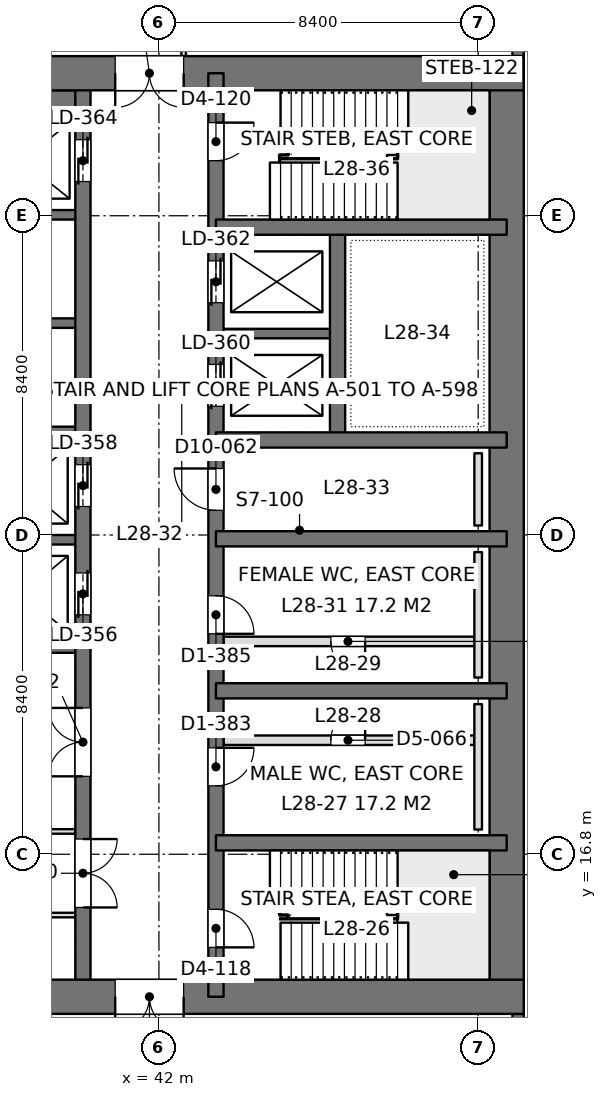
"""IFC4 building model, lengths in metres.
Left out: names, types, materials, properties, quantities, classifications, styles, units other than length and angle.
Written with IfcOpenShell. Run it as: python <this file> out.ifc"""

import sys

from ifc_helpers import new_model, si_unit, direction, frame, frame_2d, origin, place, context, subcontext, project, spatial, rectangle, extrude, element, fill, save


model = new_model("IFC4")
c1 = context("Model", 3, precision=1e-05, world=origin(), true_north=direction((0.0, 1.0)))
c2 = subcontext(c1, "Body", "Model", "MODEL_VIEW")
j1 = project(units=[si_unit("LENGTHUNIT", "METRE"), si_unit("PLANEANGLEUNIT", "RADIAN")], contexts=[c1])
p1 = place(None, origin())
s1 = spatial("IfcSite", under=j1, at=p1, CompositionType="ELEMENT")
p2 = place(p1, origin())
s2 = spatial("IfcBuilding", under=s1, at=p2, CompositionType="ELEMENT")
p3 = place(p2, frame((0.0, 0.0, 126.0)))
s3 = spatial("IfcBuildingStorey", under=s2, at=p3, CompositionType="ELEMENT", Elevation=126.0)
p4 = place(p3, frame((33.6, 13.05, 0.0), z_axis=(0.0, 0.0, 1.0), x_axis=(1.0, 0.0, 0.0)))
e1 = element("IfcWall", 1, at=p4, inside=s3, PredefinedType="SHEAR", context=c2, shape_type="SweptSolid", body=[
    extrude(rectangle(XDim=18.0, YDim=0.9, at=frame_2d((9.0, 0.0))), origin(), (0.0, 0.0, 1.0), 4.2),
])
p5 = place(p4, frame((7.25, 0.0, 0.0)))
e2 = element("IfcOpeningElement", 2, at=p5, cuts=e1, PredefinedType="OPENING", context=c2, shape_type="SweptSolid", body=[
    extrude(rectangle(XDim=1.8, YDim=2.4, at=frame_2d((0.9, 1.2))), frame((0.0, 0.46, 0.0), z_axis=(0.0, -1.0, 0.0), x_axis=(1.0, 0.0, 0.0)), (0.0, 0.0, 1.0), 0.92),
])
p6 = place(p3, frame((33.6, 37.35, 0.0), z_axis=(0.0, 0.0, 1.0), x_axis=(1.0, 0.0, 0.0)))
e3 = element("IfcWall", 3, at=p6, inside=s3, PredefinedType="SHEAR", context=c2, shape_type="SweptSolid", body=[
    extrude(rectangle(XDim=18.0, YDim=0.9, at=frame_2d((9.0, 0.0))), origin(), (0.0, 0.0, 1.0), 4.2),
])
p7 = place(p6, frame((7.25, 0.0, 0.0)))
e4 = element("IfcOpeningElement", 4, at=p7, cuts=e3, PredefinedType="OPENING", context=c2, shape_type="SweptSolid", body=[
    extrude(rectangle(XDim=1.8, YDim=2.4, at=frame_2d((0.9, 1.2))), frame((0.0, 0.46, 0.0), z_axis=(0.0, -1.0, 0.0), x_axis=(1.0, 0.0, 0.0)), (0.0, 0.0, 1.0), 0.92),
])
p8 = place(p3, frame((51.15, 13.05, 0.0), z_axis=(0.0, 0.0, 1.0), x_axis=(0.0, 1.0, 0.0)))
e5 = element("IfcWall", 5, at=p8, inside=s3, PredefinedType="SHEAR", context=c2, shape_type="SweptSolid", body=[
    extrude(rectangle(XDim=24.3, YDim=0.9, at=frame_2d((12.15, 0.0))), origin(), (0.0, 0.0, 1.0), 4.2),
])
p9 = place(p3, frame((43.5, 13.05, 0.0), z_axis=(0.0, 0.0, 1.0), x_axis=(0.0, 1.0, 0.0)))
e6 = element("IfcWall", 6, at=p9, inside=s3, PredefinedType="SHEAR", context=c2, shape_type="SweptSolid", body=[
    extrude(rectangle(XDim=24.3, YDim=0.4, at=frame_2d((12.15, 0.0))), origin(), (0.0, 0.0, 1.0), 4.2),
])
p10 = place(p9, frame((1.3, 0.0, 0.0)))
e7 = element("IfcOpeningElement", 7, at=p10, cuts=e6, PredefinedType="OPENING", context=c2, shape_type="SweptSolid", body=[
    extrude(rectangle(XDim=1.0, YDim=2.2, at=frame_2d((0.5, 1.1))), frame((0.0, 0.21, 0.0), z_axis=(0.0, -1.0, 0.0), x_axis=(1.0, 0.0, 0.0)), (0.0, 0.0, 1.0), 0.42),
])
p11 = place(p9, frame((22.0, 0.0, 0.0)))
e8 = element("IfcOpeningElement", 8, at=p11, cuts=e6, PredefinedType="OPENING", context=c2, shape_type="SweptSolid", body=[
    extrude(rectangle(XDim=1.0, YDim=2.2, at=frame_2d((0.5, 1.1))), frame((0.0, 0.21, 0.0), z_axis=(0.0, -1.0, 0.0), x_axis=(1.0, 0.0, 0.0)), (0.0, 0.0, 1.0), 0.42),
])
p12 = place(p9, frame((5.55, 0.0, 0.0)))
e9 = element("IfcOpeningElement", 9, at=p12, cuts=e6, PredefinedType="OPENING", context=c2, shape_type="SweptSolid", body=[
    extrude(rectangle(XDim=1.0, YDim=2.2, at=frame_2d((0.5, 1.1))), frame((0.0, 0.21, 0.0), z_axis=(0.0, -1.0, 0.0), x_axis=(1.0, 0.0, 0.0)), (0.0, 0.0, 1.0), 0.42),
])
p13 = place(p9, frame((9.55, 0.0, 0.0)))
e10 = element("IfcOpeningElement", 10, at=p13, cuts=e6, PredefinedType="OPENING", context=c2, shape_type="SweptSolid", body=[
    extrude(rectangle(XDim=1.0, YDim=2.2, at=frame_2d((0.5, 1.1))), frame((0.0, 0.21, 0.0), z_axis=(0.0, -1.0, 0.0), x_axis=(1.0, 0.0, 0.0)), (0.0, 0.0, 1.0), 0.42),
])
p14 = place(p9, frame((12.8, 0.0, 0.0)))
e11 = element("IfcOpeningElement", 11, at=p14, cuts=e6, PredefinedType="OPENING", context=c2, shape_type="SweptSolid", body=[
    extrude(rectangle(XDim=1.1, YDim=2.2, at=frame_2d((0.55, 1.1))), frame((0.0, 0.21, 0.0), z_axis=(0.0, -1.0, 0.0), x_axis=(1.0, 0.0, 0.0)), (0.0, 0.0, 1.0), 0.42),
])
p15 = place(p9, frame((15.538, 0.0, 0.0)))
e12 = element("IfcOpeningElement", 12, at=p15, cuts=e6, PredefinedType="OPENING", context=c2, shape_type="SweptSolid", body=[
    extrude(rectangle(XDim=1.1, YDim=2.2, at=frame_2d((0.55, 1.1))), frame((0.0, 0.21, 0.0), z_axis=(0.0, -1.0, 0.0), x_axis=(1.0, 0.0, 0.0)), (0.0, 0.0, 1.0), 0.42),
])
p16 = place(p9, frame((18.262, 0.0, 0.0)))
e13 = element("IfcOpeningElement", 13, at=p16, cuts=e6, PredefinedType="OPENING", context=c2, shape_type="SweptSolid", body=[
    extrude(rectangle(XDim=1.1, YDim=2.2, at=frame_2d((0.55, 1.1))), frame((0.0, 0.21, 0.0), z_axis=(0.0, -1.0, 0.0), x_axis=(1.0, 0.0, 0.0)), (0.0, 0.0, 1.0), 0.42),
])
p17 = place(p3, frame((40.0, 13.05, 0.0), z_axis=(0.0, 0.0, 1.0), x_axis=(0.0, 1.0, 0.0)))
e14 = element("IfcWall", 14, at=p17, inside=s3, PredefinedType="SHEAR", context=c2, shape_type="SweptSolid", body=[
    extrude(rectangle(XDim=24.3, YDim=0.4, at=frame_2d((12.15, 0.0))), origin(), (0.0, 0.0, 1.0), 4.2),
])
p18 = place(p17, frame((10.05, 0.0, 0.0)))
e15 = element("IfcOpeningElement", 15, at=p18, cuts=e14, PredefinedType="OPENING", context=c2, shape_type="SweptSolid", body=[
    extrude(rectangle(XDim=1.1, YDim=2.2, at=frame_2d((0.55, 1.1))), frame((0.0, 0.21, 0.0), z_axis=(0.0, -1.0, 0.0), x_axis=(1.0, 0.0, 0.0)), (0.0, 0.0, 1.0), 0.42),
])
p19 = place(p17, frame((12.9, 0.0, 0.0)))
e16 = element("IfcOpeningElement", 16, at=p19, cuts=e14, PredefinedType="OPENING", context=c2, shape_type="SweptSolid", body=[
    extrude(rectangle(XDim=1.1, YDim=2.2, at=frame_2d((0.55, 1.1))), frame((0.0, 0.21, 0.0), z_axis=(0.0, -1.0, 0.0), x_axis=(1.0, 0.0, 0.0)), (0.0, 0.0, 1.0), 0.42),
])
p20 = place(p17, frame((21.45, 0.0, 0.0)))
e17 = element("IfcOpeningElement", 17, at=p20, cuts=e14, PredefinedType="OPENING", context=c2, shape_type="SweptSolid", body=[
    extrude(rectangle(XDim=1.1, YDim=2.2, at=frame_2d((0.55, 1.1))), frame((0.0, 0.21, 0.0), z_axis=(0.0, -1.0, 0.0), x_axis=(1.0, 0.0, 0.0)), (0.0, 0.0, 1.0), 0.42),
])
p21 = place(p17, frame((2.35, 0.0, 0.0)))
e18 = element("IfcOpeningElement", 18, at=p21, cuts=e14, PredefinedType="OPENING", context=c2, shape_type="SweptSolid", body=[
    extrude(rectangle(XDim=1.8, YDim=2.4, at=frame_2d((0.9, 1.2))), frame((0.0, 0.21, 0.0), z_axis=(0.0, -1.0, 0.0), x_axis=(1.0, 0.0, 0.0)), (0.0, 0.0, 1.0), 0.42),
])
p22 = place(p17, frame((5.8, 0.0, 0.0)))
e19 = element("IfcOpeningElement", 19, at=p22, cuts=e14, PredefinedType="OPENING", context=c2, shape_type="SweptSolid", body=[
    extrude(rectangle(XDim=1.8, YDim=2.4, at=frame_2d((0.9, 1.2))), frame((0.0, 0.21, 0.0), z_axis=(0.0, -1.0, 0.0), x_axis=(1.0, 0.0, 0.0)), (0.0, 0.0, 1.0), 0.42),
])
for number, where, z_axis, x_axis in (
    (20, (51.15, 17.1, 0.0), (0.0, 0.0, 1.0), (-1.0, 0.0, 0.0)),
    (21, (51.15, 21.1, 0.0), (0.0, 0.0, 1.0), (-1.0, 0.0, 0.0)),
    (22, (51.15, 25.1, 0.0), (0.0, 0.0, 1.0), (-1.0, 0.0, 0.0)),
    (23, (51.15, 27.7, 0.0), (0.0, 0.0, 1.0), (-1.0, 0.0, 0.0)),
    (24, (51.15, 33.3, 0.0), (0.0, 0.0, 1.0), (-1.0, 0.0, 0.0)),
):
    element("IfcWall", number, at=place(p3, frame(where, z_axis=z_axis, x_axis=x_axis)), inside=s3, PredefinedType="SHEAR", context=c2, shape_type="SweptSolid", body=[
        extrude(rectangle(XDim=7.65, YDim=0.4, at=frame_2d((3.825, 0.0))), origin(), (0.0, 0.0, 1.0), 4.2),
    ])
p23 = place(p3, frame((46.7, 27.7, 0.0), z_axis=(0.0, 0.0, 1.0), x_axis=(0.0, 1.0, 0.0)))
e25 = element("IfcWall", 25, at=p23, inside=s3, PredefinedType="SHEAR", context=c2, shape_type="SweptSolid", body=[
    extrude(rectangle(XDim=5.6, YDim=0.4, at=frame_2d((2.8, 0.0))), origin(), (0.0, 0.0, 1.0), 4.2),
])
p24 = place(p3, frame((46.7, 30.5, 0.0), z_axis=(0.0, 0.0, 1.0), x_axis=(-1.0, 0.0, 0.0)))
e26 = element("IfcWall", 26, at=p24, inside=s3, PredefinedType="SHEAR", context=c2, shape_type="SweptSolid", body=[
    extrude(rectangle(XDim=3.2, YDim=0.25, at=frame_2d((1.6, 0.0))), origin(), (0.0, 0.0, 1.0), 4.2),
])
p25 = place(p3, frame((40.0, 22.225, 0.0), z_axis=(0.0, 0.0, 1.0), x_axis=(-1.0, 0.0, 0.0)))
e27 = element("IfcWall", 27, at=p25, inside=s3, PredefinedType="SHEAR", context=c2, shape_type="SweptSolid", body=[
    extrude(rectangle(XDim=5.95, YDim=0.25, at=frame_2d((2.975, 0.0))), origin(), (0.0, 0.0, 1.0), 4.2),
])
for number, where, z_axis, x_axis in (
    (28, (40.0, 25.075, 0.0), (0.0, 0.0, 1.0), (-1.0, 0.0, 0.0)),
    (29, (40.0, 27.925, 0.0), (0.0, 0.0, 1.0), (-1.0, 0.0, 0.0)),
    (30, (40.0, 30.775, 0.0), (0.0, 0.0, 1.0), (-1.0, 0.0, 0.0)),
    (31, (40.0, 33.625, 0.0), (0.0, 0.0, 1.0), (-1.0, 0.0, 0.0)),
):
    element("IfcWall", number, at=place(p3, frame(where, z_axis=z_axis, x_axis=x_axis)), inside=s3, PredefinedType="SHEAR", context=c2, shape_type="SweptSolid", body=[
        extrude(rectangle(XDim=3.2, YDim=0.25, at=frame_2d((1.6, 0.0))), origin(), (0.0, 0.0, 1.0), 4.2),
    ])
p26 = place(p3, frame((40.0, 36.625, 0.0), z_axis=(0.0, 0.0, 1.0), x_axis=(-1.0, 0.0, 0.0)))
e32 = element("IfcWall", 32, at=p26, inside=s3, PredefinedType="SHEAR", context=c2, shape_type="SweptSolid", body=[
    extrude(rectangle(XDim=3.2, YDim=0.55, at=frame_2d((1.6, 0.0))), origin(), (0.0, 0.0, 1.0), 4.2),
])
p27 = place(p3, frame((51.45, 42.0, 0.0), z_axis=(0.0, 0.0, 1.0), x_axis=(0.0, -1.0, 0.0)))
e33 = element("IfcWall", 33, at=p27, inside=s3, PredefinedType="SOLIDWALL", context=c2, shape_type="SweptSolid", body=[
    extrude(rectangle(XDim=4.2, YDim=0.3, at=frame_2d((2.1, 0.0))), origin(), (0.0, 0.0, 1.0), 4.05),
])
p28 = place(p27, frame((0.9, 0.0, 0.9)))
e34 = element("IfcOpeningElement", 34, at=p28, cuts=e33, PredefinedType="OPENING", context=c2, shape_type="SweptSolid", body=[
    extrude(rectangle(XDim=2.4, YDim=1.9, at=frame_2d((1.2, 0.95))), frame((0.0, 0.16, 0.0), z_axis=(0.0, -1.0, 0.0), x_axis=(1.0, 0.0, 0.0)), (0.0, 0.0, 1.0), 0.32),
])
p29 = place(p3, frame((51.45, 12.6, 0.0), z_axis=(0.0, 0.0, 1.0), x_axis=(0.0, -1.0, 0.0)))
e35 = element("IfcWall", 35, at=p29, inside=s3, PredefinedType="SOLIDWALL", context=c2, shape_type="SweptSolid", body=[
    extrude(rectangle(XDim=4.2, YDim=0.3, at=frame_2d((2.1, 0.0))), origin(), (0.0, 0.0, 1.0), 4.05),
])
p30 = place(p29, frame((0.9, 0.0, 0.9)))
e36 = element("IfcOpeningElement", 36, at=p30, cuts=e35, PredefinedType="OPENING", context=c2, shape_type="SweptSolid", body=[
    extrude(rectangle(XDim=2.4, YDim=1.9, at=frame_2d((1.2, 0.95))), frame((0.0, 0.16, 0.0), z_axis=(0.0, -1.0, 0.0), x_axis=(1.0, 0.0, 0.0)), (0.0, 0.0, 1.0), 0.32),
])
p31 = place(p3, frame((33.898, 17.4, 0.0), z_axis=(0.0, 0.0, 1.0), x_axis=(1.0, 0.0, 0.0)))
e37 = element("IfcWall", 37, at=p31, inside=s3, PredefinedType="PARTITIONING", context=c2, shape_type="SweptSolid", body=[
    extrude(rectangle(XDim=5.904, YDim=0.12, at=frame_2d((2.952, 0.0))), origin(), (0.0, 0.0, 1.0), 3.55),
])
p32 = place(p31, frame((0.752, 0.0, 0.0)))
e38 = element("IfcOpeningElement", 38, at=p32, cuts=e37, PredefinedType="OPENING", context=c2, shape_type="SweptSolid", body=[
    extrude(rectangle(XDim=1.0, YDim=2.4, at=frame_2d((0.5, 1.2))), frame((0.0, 0.07, 0.0), z_axis=(0.0, -1.0, 0.0), x_axis=(1.0, 0.0, 0.0)), (0.0, 0.0, 1.0), 0.14),
])
p33 = place(p3, frame((33.598, 15.2, 0.0), z_axis=(0.0, 0.0, 1.0), x_axis=(1.0, 0.0, 0.0)))
e39 = element("IfcWall", 39, at=p33, inside=s3, PredefinedType="PARTITIONING", context=c2, shape_type="SweptSolid", body=[
    extrude(rectangle(XDim=6.204, YDim=0.12, at=frame_2d((3.102, 0.0))), origin(), (0.0, 0.0, 1.0), 3.55),
])
p34 = place(p3, frame((42.65, 37.8, 0.0), z_axis=(0.0, 0.0, 1.0), x_axis=(0.0, 1.0, 0.0)))
e40 = element("IfcWall", 40, at=p34, inside=s3, PredefinedType="PARTITIONING", context=c2, shape_type="SweptSolid", body=[
    extrude(rectangle(XDim=2.0, YDim=0.12, at=frame_2d((1.0, 0.0))), origin(), (0.0, 0.0, 1.0), 4.05),
])
p35 = place(p3, frame((43.7, 22.4, 0.0), z_axis=(0.0, 0.0, 1.0), x_axis=(1.0, 0.0, 0.0)))
e41 = element("IfcWall", 41, at=p35, inside=s3, PredefinedType="PARTITIONING", context=c2, shape_type="SweptSolid", body=[
    extrude(rectangle(XDim=6.6, YDim=0.25, at=frame_2d((3.3, 0.0))), origin(), (0.0, 0.0, 1.0), 4.0),
])
p36 = place(p35, frame((2.825, 0.0, 0.0)))
e42 = element("IfcOpeningElement", 42, at=p36, cuts=e41, PredefinedType="OPENING", context=c2, shape_type="SweptSolid", body=[
    extrude(rectangle(XDim=0.9, YDim=2.2, at=frame_2d((0.45, 1.1))), frame((0.0, 0.135, 0.0), z_axis=(0.0, -1.0, 0.0), x_axis=(1.0, 0.0, 0.0)), (0.0, 0.0, 1.0), 0.27),
])
p37 = place(p3, frame((43.7, 19.8, 0.0), z_axis=(0.0, 0.0, 1.0), x_axis=(1.0, 0.0, 0.0)))
e43 = element("IfcWall", 43, at=p37, inside=s3, PredefinedType="PARTITIONING", context=c2, shape_type="SweptSolid", body=[
    extrude(rectangle(XDim=6.6, YDim=0.25, at=frame_2d((3.3, 0.0))), origin(), (0.0, 0.0, 1.0), 4.0),
])
p38 = place(p37, frame((2.825, 0.0, 0.0)))
e44 = element("IfcOpeningElement", 44, at=p38, cuts=e43, PredefinedType="OPENING", context=c2, shape_type="SweptSolid", body=[
    extrude(rectangle(XDim=0.9, YDim=2.2, at=frame_2d((0.45, 1.1))), frame((0.0, 0.135, 0.0), z_axis=(0.0, -1.0, 0.0), x_axis=(1.0, 0.0, 0.0)), (0.0, 0.0, 1.0), 0.27),
])
for number, where, z_axis, x_axis in (
    (45, (50.4, 17.45, 0.0), (0.0, 0.0, 1.0), (0.0, 1.0, 0.0)),
    (46, (50.4, 21.45, 0.0), (0.0, 0.0, 1.0), (0.0, 1.0, 0.0)),
):
    element("IfcWall", number, at=place(p3, frame(where, z_axis=z_axis, x_axis=x_axis)), inside=s3, PredefinedType="PLUMBINGWALL", context=c2, shape_type="SweptSolid", body=[
        extrude(rectangle(XDim=3.3, YDim=0.2, at=frame_2d((1.65, 0.0))), origin(), (0.0, 0.0, 1.0), 1.2),
    ])
p39 = place(p3, frame((50.4, 25.45, 0.0), z_axis=(0.0, 0.0, 1.0), x_axis=(0.0, 1.0, 0.0)))
e47 = element("IfcWall", 47, at=p39, inside=s3, PredefinedType="PLUMBINGWALL", context=c2, shape_type="SweptSolid", body=[
    extrude(rectangle(XDim=1.9, YDim=0.2, at=frame_2d((0.95, 0.0))), origin(), (0.0, 0.0, 1.0), 1.2),
])
p40 = place(p5, frame((1.8, 0.0, 0.0), z_axis=(0.0, 0.0, 1.0), x_axis=(-1.0, 0.0, 0.0)))
e48 = element("IfcDoor", 48, at=p40, inside=s3, OperationType="DOUBLE_DOOR_SINGLE_SWING", PredefinedType="DOOR", context=c2, shape_type="SweptSolid", body=[
    extrude(rectangle(XDim=1.8, YDim=2.4, at=frame_2d((0.9, 1.2))), frame((0.0, 0.025, 0.0), z_axis=(0.0, -1.0, 0.0), x_axis=(1.0, 0.0, 0.0)), (0.0, 0.0, 1.0), 0.05),
])
fill(e2, e48)
p41 = place(p7, frame((1.8, 0.0, 0.0), z_axis=(0.0, 0.0, 1.0), x_axis=(-1.0, 0.0, 0.0)))
e49 = element("IfcDoor", 49, at=p41, inside=s3, OperationType="DOUBLE_DOOR_SINGLE_SWING", PredefinedType="DOOR", context=c2, shape_type="SweptSolid", body=[
    extrude(rectangle(XDim=1.8, YDim=2.4, at=frame_2d((0.9, 1.2))), frame((0.0, 0.025, 0.0), z_axis=(0.0, -1.0, 0.0), x_axis=(1.0, 0.0, 0.0)), (0.0, 0.0, 1.0), 0.05),
])
fill(e4, e49)
p42 = place(p10, frame((1.0, 0.0, 0.0), z_axis=(0.0, 0.0, 1.0), x_axis=(-1.0, 0.0, 0.0)))
e50 = element("IfcDoor", 50, at=p42, inside=s3, OperationType="SINGLE_SWING_RIGHT", PredefinedType="DOOR", context=c2, shape_type="SweptSolid", body=[
    extrude(rectangle(XDim=1.0, YDim=2.2, at=frame_2d((0.5, 1.1))), frame((0.0, 0.025, 0.0), z_axis=(0.0, -1.0, 0.0), x_axis=(1.0, 0.0, 0.0)), (0.0, 0.0, 1.0), 0.05),
])
fill(e7, e50)
p43 = place(p11, frame((1.0, 0.0, 0.0), z_axis=(0.0, 0.0, 1.0), x_axis=(-1.0, 0.0, 0.0)))
e51 = element("IfcDoor", 51, at=p43, inside=s3, OperationType="SINGLE_SWING_LEFT", PredefinedType="DOOR", context=c2, shape_type="SweptSolid", body=[
    extrude(rectangle(XDim=1.0, YDim=2.2, at=frame_2d((0.5, 1.1))), frame((0.0, 0.025, 0.0), z_axis=(0.0, -1.0, 0.0), x_axis=(1.0, 0.0, 0.0)), (0.0, 0.0, 1.0), 0.05),
])
fill(e8, e51)
p44 = place(p12, frame((1.0, 0.0, 0.0), z_axis=(0.0, 0.0, 1.0), x_axis=(-1.0, 0.0, 0.0)))
e52 = element("IfcDoor", 52, at=p44, inside=s3, OperationType="SINGLE_SWING_LEFT", PredefinedType="DOOR", context=c2, shape_type="SweptSolid", body=[
    extrude(rectangle(XDim=1.0, YDim=2.2, at=frame_2d((0.5, 1.1))), frame((0.0, 0.025, 0.0), z_axis=(0.0, -1.0, 0.0), x_axis=(1.0, 0.0, 0.0)), (0.0, 0.0, 1.0), 0.05),
])
fill(e9, e52)
p45 = place(p13, frame((1.0, 0.0, 0.0), z_axis=(0.0, 0.0, 1.0), x_axis=(-1.0, 0.0, 0.0)))
e53 = element("IfcDoor", 53, at=p45, inside=s3, OperationType="SINGLE_SWING_RIGHT", PredefinedType="DOOR", context=c2, shape_type="SweptSolid", body=[
    extrude(rectangle(XDim=1.0, YDim=2.2, at=frame_2d((0.5, 1.1))), frame((0.0, 0.025, 0.0), z_axis=(0.0, -1.0, 0.0), x_axis=(1.0, 0.0, 0.0)), (0.0, 0.0, 1.0), 0.05),
])
fill(e10, e53)
p46 = place(p14, origin())
e54 = element("IfcDoor", 54, at=p46, inside=s3, OperationType="SINGLE_SWING_RIGHT", PredefinedType="DOOR", context=c2, shape_type="SweptSolid", body=[
    extrude(rectangle(XDim=1.1, YDim=2.2, at=frame_2d((0.55, 1.1))), frame((0.0, 0.025, 0.0), z_axis=(0.0, -1.0, 0.0), x_axis=(1.0, 0.0, 0.0)), (0.0, 0.0, 1.0), 0.05),
])
fill(e11, e54)
p47 = place(p18, origin())
e55 = element("IfcDoor", 55, at=p47, inside=s3, OperationType="DOUBLE_DOOR_SLIDING", PredefinedType="DOOR", context=c2, shape_type="SweptSolid", body=[
    extrude(rectangle(XDim=1.1, YDim=2.2, at=frame_2d((0.55, 1.1))), frame((0.0, 0.025, 0.0), z_axis=(0.0, -1.0, 0.0), x_axis=(1.0, 0.0, 0.0)), (0.0, 0.0, 1.0), 0.05),
])
fill(e15, e55)
p48 = place(p19, origin())
e56 = element("IfcDoor", 56, at=p48, inside=s3, OperationType="DOUBLE_DOOR_SLIDING", PredefinedType="DOOR", context=c2, shape_type="SweptSolid", body=[
    extrude(rectangle(XDim=1.1, YDim=2.2, at=frame_2d((0.55, 1.1))), frame((0.0, 0.025, 0.0), z_axis=(0.0, -1.0, 0.0), x_axis=(1.0, 0.0, 0.0)), (0.0, 0.0, 1.0), 0.05),
])
fill(e16, e56)
p49 = place(p20, origin())
e57 = element("IfcDoor", 57, at=p49, inside=s3, OperationType="DOUBLE_DOOR_SLIDING", PredefinedType="DOOR", context=c2, shape_type="SweptSolid", body=[
    extrude(rectangle(XDim=1.1, YDim=2.2, at=frame_2d((0.55, 1.1))), frame((0.0, 0.025, 0.0), z_axis=(0.0, -1.0, 0.0), x_axis=(1.0, 0.0, 0.0)), (0.0, 0.0, 1.0), 0.05),
])
fill(e17, e57)
p50 = place(p15, origin())
e58 = element("IfcDoor", 58, at=p50, inside=s3, OperationType="DOUBLE_DOOR_SLIDING", PredefinedType="DOOR", context=c2, shape_type="SweptSolid", body=[
    extrude(rectangle(XDim=1.1, YDim=2.2, at=frame_2d((0.55, 1.1))), frame((0.0, 0.025, 0.0), z_axis=(0.0, -1.0, 0.0), x_axis=(1.0, 0.0, 0.0)), (0.0, 0.0, 1.0), 0.05),
])
fill(e12, e58)
p51 = place(p16, origin())
e59 = element("IfcDoor", 59, at=p51, inside=s3, OperationType="DOUBLE_DOOR_SLIDING", PredefinedType="DOOR", context=c2, shape_type="SweptSolid", body=[
    extrude(rectangle(XDim=1.1, YDim=2.2, at=frame_2d((0.55, 1.1))), frame((0.0, 0.025, 0.0), z_axis=(0.0, -1.0, 0.0), x_axis=(1.0, 0.0, 0.0)), (0.0, 0.0, 1.0), 0.05),
])
fill(e13, e59)
p52 = place(p21, frame((1.8, 0.0, 0.0), z_axis=(0.0, 0.0, 1.0), x_axis=(-1.0, 0.0, 0.0)))
e60 = element("IfcDoor", 60, at=p52, inside=s3, OperationType="DOUBLE_DOOR_SINGLE_SWING", PredefinedType="DOOR", context=c2, shape_type="SweptSolid", body=[
    extrude(rectangle(XDim=1.8, YDim=2.4, at=frame_2d((0.9, 1.2))), frame((0.0, 0.025, 0.0), z_axis=(0.0, -1.0, 0.0), x_axis=(1.0, 0.0, 0.0)), (0.0, 0.0, 1.0), 0.05),
])
fill(e18, e60)
p53 = place(p22, origin())
e61 = element("IfcDoor", 61, at=p53, inside=s3, OperationType="DOUBLE_DOOR_SINGLE_SWING", PredefinedType="DOOR", context=c2, shape_type="SweptSolid", body=[
    extrude(rectangle(XDim=1.8, YDim=2.4, at=frame_2d((0.9, 1.2))), frame((0.0, 0.025, 0.0), z_axis=(0.0, -1.0, 0.0), x_axis=(1.0, 0.0, 0.0)), (0.0, 0.0, 1.0), 0.05),
])
fill(e19, e61)
p54 = place(p36, frame((0.9, 0.0, 0.0), z_axis=(0.0, 0.0, 1.0), x_axis=(-1.0, 0.0, 0.0)))
e62 = element("IfcDoor", 62, at=p54, inside=s3, OperationType="SINGLE_SWING_LEFT", PredefinedType="DOOR", context=c2, shape_type="SweptSolid", body=[
    extrude(rectangle(XDim=0.9, YDim=2.2, at=frame_2d((0.45, 1.1))), frame((0.0, 0.025, 0.0), z_axis=(0.0, -1.0, 0.0), x_axis=(1.0, 0.0, 0.0)), (0.0, 0.0, 1.0), 0.05),
])
fill(e42, e62)
p55 = place(p38, origin())
e63 = element("IfcDoor", 63, at=p55, inside=s3, OperationType="SINGLE_SWING_RIGHT", PredefinedType="DOOR", context=c2, shape_type="SweptSolid", body=[
    extrude(rectangle(XDim=0.9, YDim=2.2, at=frame_2d((0.45, 1.1))), frame((0.0, 0.025, 0.0), z_axis=(0.0, -1.0, 0.0), x_axis=(1.0, 0.0, 0.0)), (0.0, 0.0, 1.0), 0.05),
])
fill(e44, e63)
save(model, sys.argv[1])
